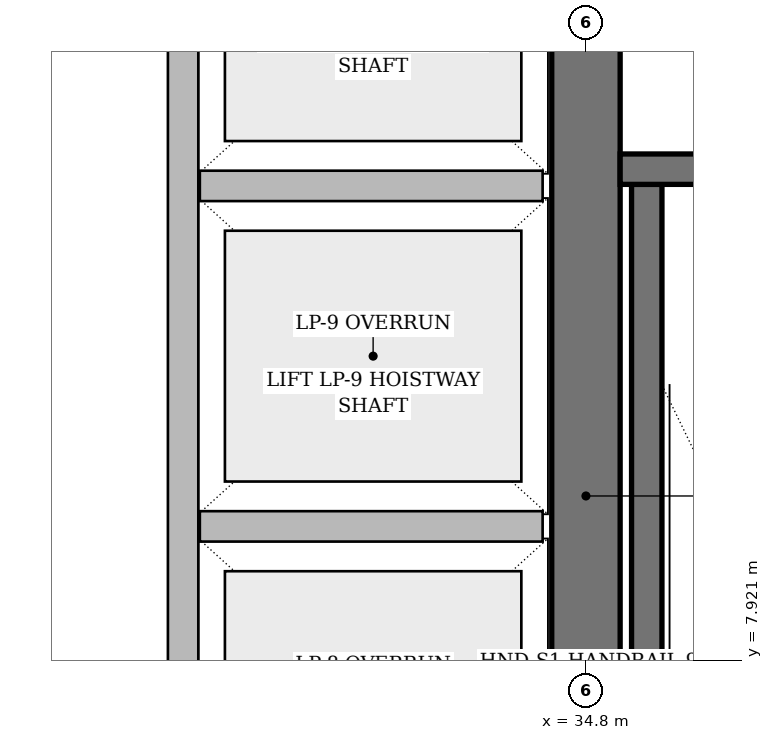
"""IFC4 building model, lengths in metres.
Left out: names, types, materials, properties, quantities, classifications, styles, units other than length and angle.
Written with IfcOpenShell. Run it as: python <this file> out.ifc"""

import sys

from ifc_helpers import new_model, si_unit, direction, frame, frame_2d, origin, place, context, subcontext, project, spatial, rectangle, extrude, element, save


model = new_model("IFC4")
c1 = context("Model", 3, precision=1e-05, world=origin(), true_north=direction((0.0, 1.0)))
c2 = subcontext(c1, "Body", "Model", "MODEL_VIEW")
j1 = project(units=[si_unit("LENGTHUNIT", "METRE"), si_unit("PLANEANGLEUNIT", "RADIAN")], contexts=[c1])
p1 = place(None, origin())
s1 = spatial("IfcSite", under=j1, at=p1, CompositionType="ELEMENT")
p2 = place(p1, origin())
s2 = spatial("IfcBuilding", under=s1, at=p2, CompositionType="ELEMENT")
p3 = place(p2, frame((0.0, 0.0, 299.1)))
s3 = spatial("IfcBuildingStorey", under=s2, at=p3, CompositionType="ELEMENT", Elevation=299.1)
p4 = place(p3, frame((34.8, 3.825, 0.0), z_axis=(0.0, 0.0, 1.0), x_axis=(0.0, 1.0, 0.0)))
e1 = element("IfcWall", 1, at=p4, inside=s3, PredefinedType="SHEAR", context=c2, shape_type="SweptSolid", body=[
    extrude(rectangle(XDim=10.35, YDim=0.45, at=frame_2d((5.175, 0.0))), origin(), (0.0, 0.0, 1.0), 4.8),
])
p5 = place(p3, frame((35.2, 4.1, 0.0), z_axis=(0.0, 0.0, 1.0), x_axis=(0.0, 1.0, 0.0)))
e2 = element("IfcWall", 2, at=p5, inside=s3, PredefinedType="SHEAR", context=c2, shape_type="SweptSolid", body=[
    extrude(rectangle(XDim=6.95, YDim=0.2, at=frame_2d((3.475, 0.0))), origin(), (0.0, 0.0, 1.0), 4.8),
])
p6 = place(p3, frame((35.025, 11.15, 0.0), z_axis=(0.0, 0.0, 1.0), x_axis=(1.0, 0.0, 0.0)))
e3 = element("IfcWall", 3, at=p6, inside=s3, PredefinedType="SHEAR", context=c2, shape_type="SweptSolid", body=[
    extrude(rectangle(XDim=3.215, YDim=0.2, at=frame_2d((1.607, 0.0))), origin(), (0.0, 0.0, 1.0), 4.8),
])
p7 = place(p6, frame((1.12, 0.0, 0.0)))
e4 = element("IfcOpeningElement", 4, at=p7, cuts=e3, PredefinedType="OPENING", context=c2, shape_type="SweptSolid", body=[
    extrude(rectangle(XDim=1.05, YDim=2.2, at=frame_2d((0.525, 1.1))), frame((0.0, 0.11, 0.0), z_axis=(0.0, -1.0, 0.0), x_axis=(1.0, 0.0, 0.0)), (0.0, 0.0, 1.0), 0.22),
])
p8 = place(p3, frame((32.15, 4.39, 0.0), z_axis=(0.0, 0.0, 1.0), x_axis=(0.0, 1.0, 0.0)))
e5 = element("IfcWall", 5, at=p8, inside=s3, PredefinedType="PARTITIONING", context=c2, shape_type="SweptSolid", body=[
    extrude(rectangle(XDim=8.82, YDim=0.2, at=frame_2d((4.41, 0.0))), origin(), (0.0, 0.0, 1.0), 4.5),
])
for number, where, z_axis, x_axis in (
    (6, (32.26, 8.8, 0.0), (0.0, 0.0, 1.0), (1.0, 0.0, 0.0)),
    (7, (32.26, 11.04, 0.0), (0.0, 0.0, 1.0), (1.0, 0.0, 0.0)),
):
    element("IfcWall", number, at=place(p3, frame(where, z_axis=z_axis, x_axis=x_axis)), inside=s3, PredefinedType="PARTITIONING", context=c2, shape_type="SweptSolid", body=[
        extrude(rectangle(XDim=2.255, YDim=0.2, at=frame_2d((1.127, 0.0))), origin(), (0.0, 0.0, 1.0), 4.5),
    ])
save(model, sys.argv[1])
